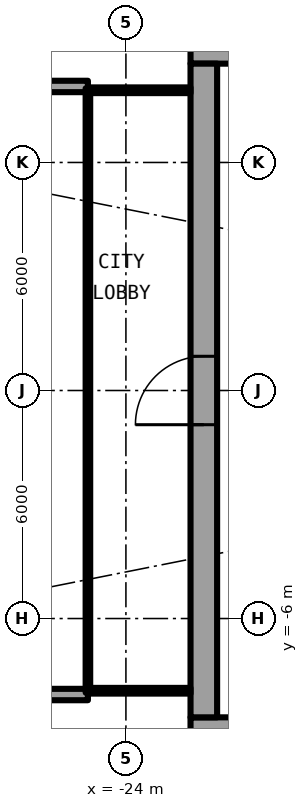
"""IFC4 building model, lengths in metres.
Left out: names, types, materials, properties, quantities, classifications, styles, units other than length and angle.
Written with IfcOpenShell. Run it as: python <this file> out.ifc"""

import sys

from ifc_helpers import new_model, si_unit, direction, frame, frame_2d, origin, place, context, subcontext, project, spatial, rectangle, extrude, element, fill, save


model = new_model("IFC4")
c1 = context("Model", 3, precision=1e-05, world=origin(), true_north=direction((0.0, 1.0)))
c2 = subcontext(c1, "Body", "Model", "MODEL_VIEW")
j1 = project(units=[si_unit("LENGTHUNIT", "METRE"), si_unit("PLANEANGLEUNIT", "RADIAN")], contexts=[c1])
p1 = place(None, origin())
s1 = spatial("IfcSite", under=j1, at=p1, CompositionType="ELEMENT")
p2 = place(p1, origin())
s2 = spatial("IfcBuilding", under=s1, at=p2, CompositionType="ELEMENT")
p3 = place(p2, frame((0.0, 0.0, 91.05)))
s3 = spatial("IfcBuildingStorey", under=s2, at=p3, CompositionType="ELEMENT", Elevation=91.05)
for number, where, z_axis, x_axis in (
    (1, (-25.0, 8.0, 0.0), (0.0, 0.0, 1.0), (-1.0, 0.0, 0.0)),
    (2, (-25.0, -8.0, 0.0), (0.0, 0.0, 1.0), (-1.0, 0.0, 0.0)),
):
    element("IfcWall", number, at=place(p3, frame(where, z_axis=z_axis, x_axis=x_axis)), inside=s3, PredefinedType="SOLIDWALL", context=c2, shape_type="SweptSolid", body=[
        extrude(rectangle(XDim=2.667, YDim=0.3, at=frame_2d((1.333, 0.0))), origin(), (0.0, 0.0, 1.0), 2.7),
    ])
p4 = place(p3, frame((-22.3, -8.95, 0.0), z_axis=(0.0, 0.0, 1.0), x_axis=(1.0, 0.0, 0.0)))
e3 = element("IfcWall", 3, at=p4, inside=s3, PredefinedType="SHEAR", context=c2, shape_type="SweptSolid", body=[
    extrude(rectangle(XDim=14.0, YDim=0.7, at=frame_2d((7.0, 0.0))), origin(), (0.0, 0.0, 1.0), 3.05),
])
p5 = place(p4, frame((1.225, 0.0, 0.0)))
e4 = element("IfcOpeningElement", 4, at=p5, cuts=e3, PredefinedType="OPENING", context=c2, shape_type="SweptSolid", body=[
    extrude(rectangle(XDim=1.2, YDim=2.3, at=frame_2d((0.6, 1.15))), frame((0.0, 0.36, 0.0), z_axis=(0.0, -1.0, 0.0), x_axis=(1.0, 0.0, 0.0)), (0.0, 0.0, 1.0), 0.72),
])
p6 = place(p3, frame((-8.3, 8.95, 0.0), z_axis=(0.0, 0.0, 1.0), x_axis=(-1.0, 0.0, 0.0)))
e5 = element("IfcWall", 5, at=p6, inside=s3, PredefinedType="SHEAR", context=c2, shape_type="SweptSolid", body=[
    extrude(rectangle(XDim=14.0, YDim=0.7, at=frame_2d((7.0, 0.0))), origin(), (0.0, 0.0, 1.0), 3.05),
])
p7 = place(p6, frame((11.575, 0.0, 0.0)))
e6 = element("IfcOpeningElement", 6, at=p7, cuts=e5, PredefinedType="OPENING", context=c2, shape_type="SweptSolid", body=[
    extrude(rectangle(XDim=1.2, YDim=2.3, at=frame_2d((0.6, 1.15))), frame((0.0, 0.36, 0.0), z_axis=(0.0, -1.0, 0.0), x_axis=(1.0, 0.0, 0.0)), (0.0, 0.0, 1.0), 0.72),
])
p8 = place(p3, frame((-21.95, -8.6, 0.0), z_axis=(0.0, 0.0, 1.0), x_axis=(0.0, 1.0, 0.0)))
e7 = element("IfcWall", 7, at=p8, inside=s3, PredefinedType="SHEAR", context=c2, shape_type="SweptSolid", body=[
    extrude(rectangle(XDim=17.2, YDim=0.7, at=frame_2d((8.6, 0.0))), origin(), (0.0, 0.0, 1.0), 3.05),
])
p9 = place(p8, frame((7.7, 0.0, 0.0)))
e8 = element("IfcOpeningElement", 8, at=p9, cuts=e7, PredefinedType="OPENING", context=c2, shape_type="SweptSolid", body=[
    extrude(rectangle(XDim=1.8, YDim=2.3, at=frame_2d((0.9, 1.15))), frame((0.0, 0.36, 0.0), z_axis=(0.0, -1.0, 0.0), x_axis=(1.0, 0.0, 0.0)), (0.0, 0.0, 1.0), 0.72),
])
for number, where, z_axis, x_axis in (
    (9, (-22.3, 7.9, 0.0), (0.0, 0.0, 1.0), (-1.0, 0.0, 0.0)),
    (10, (-22.3, -7.9, 0.0), (0.0, 0.0, 1.0), (-1.0, 0.0, 0.0)),
):
    element("IfcWall", number, at=place(p3, frame(where, z_axis=z_axis, x_axis=x_axis)), inside=s3, PredefinedType="PARTITIONING", context=c2, shape_type="SweptSolid", body=[
        extrude(rectangle(XDim=2.64, YDim=0.15, at=frame_2d((1.32, 0.0))), origin(), (0.0, 0.0, 1.0), 2.7),
    ])
p10 = place(p3, frame((-25.0, 7.95, 0.0), z_axis=(0.0, 0.0, 1.0), x_axis=(0.0, -1.0, 0.0)))
e11 = element("IfcWall", 11, at=p10, inside=s3, PredefinedType="PARTITIONING", context=c2, shape_type="SweptSolid", body=[
    extrude(rectangle(XDim=15.9, YDim=0.12, at=frame_2d((7.95, 0.0))), origin(), (0.0, 0.0, 1.0), 2.7),
])
p11 = place(p10, frame((0.95, 0.0, 0.1)))
e12 = element("IfcOpeningElement", 12, at=p11, cuts=e11, PredefinedType="OPENING", context=c2, shape_type="SweptSolid", body=[
    extrude(rectangle(XDim=14.0, YDim=2.35, at=frame_2d((7.0, 1.175))), frame((0.0, 0.07, 0.0), z_axis=(0.0, -1.0, 0.0), x_axis=(1.0, 0.0, 0.0)), (0.0, 0.0, 1.0), 0.14),
])
p12 = place(p9, origin())
e13 = element("IfcDoor", 13, at=p12, inside=s3, OperationType="SINGLE_SWING_LEFT", PredefinedType="DOOR", context=c2, shape_type="SweptSolid", body=[
    extrude(rectangle(XDim=1.8, YDim=2.3, at=frame_2d((0.9, 1.15))), frame((0.0, 0.025, 0.0), z_axis=(0.0, -1.0, 0.0), x_axis=(1.0, 0.0, 0.0)), (0.0, 0.0, 1.0), 0.05),
])
fill(e8, e13)
p13 = place(p11, origin())
e14 = element("IfcWindow", 14, at=p13, inside=s3, PartitioningType="SINGLE_PANEL", PredefinedType="WINDOW", context=c2, shape_type="SweptSolid", body=[
    extrude(rectangle(XDim=14.0, YDim=2.35, at=frame_2d((7.0, 1.175))), frame((0.0, 0.03, 0.0), z_axis=(0.0, -1.0, 0.0), x_axis=(1.0, 0.0, 0.0)), (0.0, 0.0, 1.0), 0.06),
])
fill(e12, e14)
save(model, sys.argv[1])
